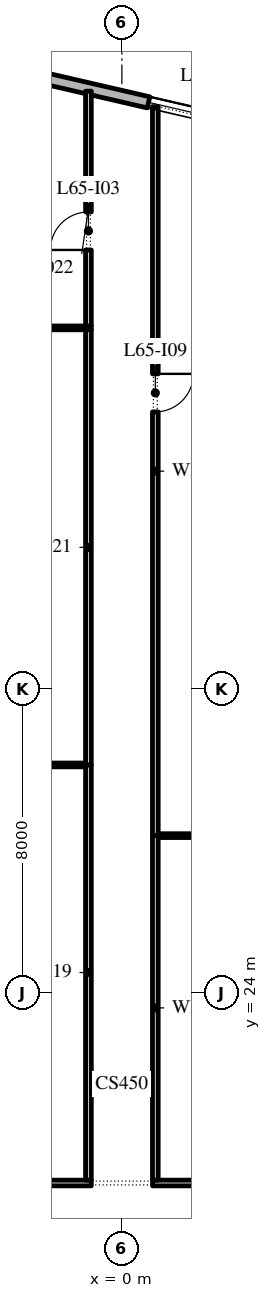
"""IFC4 building model, lengths in metres.
Left out: names, types, materials, properties, quantities, classifications, styles, units other than length and angle.
Written with IfcOpenShell. Run it as: python <this file> out.ifc"""

import sys

from ifc_helpers import new_model, si_unit, direction, frame, frame_2d, origin, place, context, subcontext, project, spatial, rectangle, extrude, element, fill, save


model = new_model("IFC4")
c1 = context("Model", 3, precision=1e-05, world=origin(), true_north=direction((0.0, 1.0)))
c2 = subcontext(c1, "Body", "Model", "MODEL_VIEW")
j1 = project(units=[si_unit("LENGTHUNIT", "METRE"), si_unit("PLANEANGLEUNIT", "RADIAN")], contexts=[c1])
p1 = place(None, origin())
s1 = spatial("IfcSite", under=j1, at=p1, CompositionType="ELEMENT")
p2 = place(p1, origin())
s2 = spatial("IfcBuilding", under=s1, at=p2, CompositionType="ELEMENT")
p3 = place(p2, frame((0.0, 0.0, 297.6)))
s3 = spatial("IfcBuildingStorey", under=s2, at=p3, CompositionType="ELEMENT", Elevation=297.6)
p4 = place(p3, frame((29.616, 40.758, 0.0), z_axis=(0.0, 0.0, 1.0), x_axis=(-0.974370532314, 0.224949029246, 0.0)))
e1 = element("IfcWall", 1, at=p4, inside=s3, PredefinedType="STANDARD", context=c2, shape_type="SweptSolid", body=[
    extrude(rectangle(XDim=48.0, YDim=0.3, at=frame_2d((24.0, 0.0))), origin(), (0.0, 0.0, 1.0), 4.95),
])
p5 = place(p4, frame((2.075, 0.0, 0.6)))
e2 = element("IfcOpeningElement", 2, at=p5, cuts=e1, PredefinedType="OPENING", context=c2, shape_type="SweptSolid", body=[
    extrude(rectangle(XDim=3.6, YDim=3.9, at=frame_2d((1.8, 1.95))), frame((0.0, 0.16, 0.0), z_axis=(0.0, -1.0, 0.0), x_axis=(1.0, 0.0, 0.0)), (0.0, 0.0, 1.0), 0.32),
])
p6 = place(p4, frame((9.975, 0.0, 0.6)))
e3 = element("IfcOpeningElement", 3, at=p6, cuts=e1, PredefinedType="OPENING", context=c2, shape_type="SweptSolid", body=[
    extrude(rectangle(XDim=3.6, YDim=3.55, at=frame_2d((1.8, 1.775))), frame((0.0, 0.16, 0.0), z_axis=(0.0, -1.0, 0.0), x_axis=(1.0, 0.0, 0.0)), (0.0, 0.0, 1.0), 0.32),
])
p7 = place(p4, frame((18.025, 0.0, 0.6)))
e4 = element("IfcOpeningElement", 4, at=p7, cuts=e1, PredefinedType="OPENING", context=c2, shape_type="SweptSolid", body=[
    extrude(rectangle(XDim=3.6, YDim=3.55, at=frame_2d((1.8, 1.775))), frame((0.0, 0.16, 0.0), z_axis=(0.0, -1.0, 0.0), x_axis=(1.0, 0.0, 0.0)), (0.0, 0.0, 1.0), 0.32),
])
p8 = place(p4, frame((26.075, 0.0, 0.6)))
e5 = element("IfcOpeningElement", 5, at=p8, cuts=e1, PredefinedType="OPENING", context=c2, shape_type="SweptSolid", body=[
    extrude(rectangle(XDim=3.6, YDim=3.9, at=frame_2d((1.8, 1.95))), frame((0.0, 0.16, 0.0), z_axis=(0.0, -1.0, 0.0), x_axis=(1.0, 0.0, 0.0)), (0.0, 0.0, 1.0), 0.32),
])
p9 = place(p4, frame((34.125, 0.0, 0.6)))
e6 = element("IfcOpeningElement", 6, at=p9, cuts=e1, PredefinedType="OPENING", context=c2, shape_type="SweptSolid", body=[
    extrude(rectangle(XDim=3.6, YDim=3.55, at=frame_2d((1.8, 1.775))), frame((0.0, 0.16, 0.0), z_axis=(0.0, -1.0, 0.0), x_axis=(1.0, 0.0, 0.0)), (0.0, 0.0, 1.0), 0.32),
])
p10 = place(p4, frame((42.175, 0.0, 0.6)))
e7 = element("IfcOpeningElement", 7, at=p10, cuts=e1, PredefinedType="OPENING", context=c2, shape_type="SweptSolid", body=[
    extrude(rectangle(XDim=3.6, YDim=3.9, at=frame_2d((1.8, 1.95))), frame((0.0, 0.16, 0.0), z_axis=(0.0, -1.0, 0.0), x_axis=(1.0, 0.0, 0.0)), (0.0, 0.0, 1.0), 0.32),
])
p11 = place(p3, frame((33.159, 47.524, -0.05), z_axis=(0.0, 0.0, 1.0), x_axis=(-0.974370681559, 0.224948382787, 0.0)))
e8 = element("IfcWall", 8, at=p11, inside=s3, PredefinedType="STANDARD", context=c2, shape_type="SweptSolid", body=[
    extrude(rectangle(XDim=51.76, YDim=0.2, at=frame_2d((25.88, 0.0))), origin(), (0.0, 0.0, 1.0), 1.1),
])
p12 = place(p3, frame((-8.475, 19.0, 0.0), z_axis=(0.0, 0.0, 1.0), x_axis=(1.0, 0.0, 0.0)))
e9 = element("IfcWall", 9, at=p12, inside=s3, PredefinedType="PARTITIONING", context=c2, shape_type="SweptSolid", body=[
    extrude(rectangle(XDim=7.67, YDim=0.15, at=frame_2d((3.835, 0.0))), origin(), (0.0, 0.0, 1.0), 4.95),
])
p13 = place(p3, frame((-8.325, 41.5, 0.0), z_axis=(0.0, 0.0, 1.0), x_axis=(1.0, 0.0, 0.0)))
e10 = element("IfcWall", 10, at=p13, inside=s3, PredefinedType="PARTITIONING", context=c2, shape_type="SweptSolid", body=[
    extrude(rectangle(XDim=7.52, YDim=0.1, at=frame_2d((3.76, 0.0))), origin(), (0.0, 0.0, 1.0), 4.95),
])
p14 = place(p3, frame((-0.88, 19.075, 0.0), z_axis=(0.0, 0.0, 1.0), x_axis=(0.0, 1.0, 0.0)))
e11 = element("IfcWall", 11, at=p14, inside=s3, PredefinedType="PARTITIONING", context=c2, shape_type="SweptSolid", body=[
    extrude(rectangle(XDim=10.925, YDim=0.15, at=frame_2d((5.462, 0.0))), origin(), (0.0, 0.0, 1.0), 4.95),
])
p15 = place(p3, frame((-0.955, 30.0, 0.0), z_axis=(0.0, 0.0, 1.0), x_axis=(-1.0, 0.0, 0.0)))
e12 = element("IfcWall", 12, at=p15, inside=s3, PredefinedType="PARTITIONING", context=c2, shape_type="SweptSolid", body=[
    extrude(rectangle(XDim=7.37, YDim=0.1, at=frame_2d((3.685, 0.0))), origin(), (0.0, 0.0, 1.0), 4.95),
])
p16 = place(p3, frame((-0.88, 30.0, 0.0), z_axis=(0.0, 0.0, 1.0), x_axis=(0.0, 1.0, 0.0)))
e13 = element("IfcWall", 13, at=p16, inside=s3, PredefinedType="PARTITIONING", context=c2, shape_type="SweptSolid", body=[
    extrude(rectangle(XDim=11.45, YDim=0.15, at=frame_2d((5.725, 0.0))), origin(), (0.0, 0.0, 1.0), 4.95),
])
p17 = place(p3, frame((-0.88, 41.55, 0.0), z_axis=(0.0, 0.0, 1.0), x_axis=(0.0, 1.0, 0.0)))
e14 = element("IfcWall", 14, at=p17, inside=s3, PredefinedType="PARTITIONING", context=c2, shape_type="SweptSolid", body=[
    extrude(rectangle(XDim=6.178, YDim=0.15, at=frame_2d((3.089, 0.0))), origin(), (0.0, 0.0, 1.0), 4.95),
])
p18 = place(p17, frame((2.0, 0.0, 0.0)))
e15 = element("IfcOpeningElement", 15, at=p18, cuts=e14, PredefinedType="OPENING", context=c2, shape_type="SweptSolid", body=[
    extrude(rectangle(XDim=1.0, YDim=2.1, at=frame_2d((0.5, 1.05))), frame((0.0, 0.085, 0.0), z_axis=(0.0, -1.0, 0.0), x_axis=(1.0, 0.0, 0.0)), (0.0, 0.0, 1.0), 0.17),
])
p19 = place(p3, frame((0.805, 19.0, 0.0), z_axis=(0.0, 0.0, 1.0), x_axis=(1.0, 0.0, 0.0)))
e16 = element("IfcWall", 16, at=p19, inside=s3, PredefinedType="PARTITIONING", context=c2, shape_type="SweptSolid", body=[
    extrude(rectangle(XDim=7.67, YDim=0.15, at=frame_2d((3.835, 0.0))), origin(), (0.0, 0.0, 1.0), 4.95),
])
p20 = place(p3, frame((0.88, 28.14, 0.0), z_axis=(0.0, 0.0, 1.0), x_axis=(0.0, -1.0, 0.0)))
e17 = element("IfcWall", 17, at=p20, inside=s3, PredefinedType="PARTITIONING", context=c2, shape_type="SweptSolid", body=[
    extrude(rectangle(XDim=9.065, YDim=0.15, at=frame_2d((4.532, 0.0))), origin(), (0.0, 0.0, 1.0), 4.95),
])
p21 = place(p3, frame((0.955, 28.14, 0.0), z_axis=(0.0, 0.0, 1.0), x_axis=(1.0, 0.0, 0.0)))
e18 = element("IfcWall", 18, at=p21, inside=s3, PredefinedType="PARTITIONING", context=c2, shape_type="SweptSolid", body=[
    extrude(rectangle(XDim=7.52, YDim=0.1, at=frame_2d((3.76, 0.0))), origin(), (0.0, 0.0, 1.0), 4.95),
])
p22 = place(p3, frame((0.88, 47.321, 0.0), z_axis=(0.0, 0.0, 1.0), x_axis=(0.0, -1.0, 0.0)))
e19 = element("IfcWall", 19, at=p22, inside=s3, PredefinedType="PARTITIONING", context=c2, shape_type="SweptSolid", body=[
    extrude(rectangle(XDim=19.181, YDim=0.15, at=frame_2d((9.591, 0.0))), origin(), (0.0, 0.0, 1.0), 4.95),
])
p23 = place(p22, frame((7.031, 0.0, 0.0)))
e20 = element("IfcOpeningElement", 20, at=p23, cuts=e19, PredefinedType="OPENING", context=c2, shape_type="SweptSolid", body=[
    extrude(rectangle(XDim=1.0, YDim=2.1, at=frame_2d((0.5, 1.05))), frame((0.0, 0.085, 0.0), z_axis=(0.0, -1.0, 0.0), x_axis=(1.0, 0.0, 0.0)), (0.0, 0.0, 1.0), 0.17),
])
p24 = place(p8, origin())
e21 = element("IfcWindow", 21, at=p24, inside=s3, PartitioningType="DOUBLE_PANEL_HORIZONTAL", PredefinedType="WINDOW", context=c2, shape_type="SweptSolid", body=[
    extrude(rectangle(XDim=3.6, YDim=3.9, at=frame_2d((1.8, 1.95))), frame((0.0, 0.03, 0.0), z_axis=(0.0, -1.0, 0.0), x_axis=(1.0, 0.0, 0.0)), (0.0, 0.0, 1.0), 0.06),
])
fill(e5, e21)
p25 = place(p18, origin())
e22 = element("IfcDoor", 22, at=p25, inside=s3, OperationType="SINGLE_SWING_RIGHT", PredefinedType="DOOR", context=c2, shape_type="SweptSolid", body=[
    extrude(rectangle(XDim=1.0, YDim=2.1, at=frame_2d((0.5, 1.05))), frame((0.0, 0.025, 0.0), z_axis=(0.0, -1.0, 0.0), x_axis=(1.0, 0.0, 0.0)), (0.0, 0.0, 1.0), 0.05),
])
fill(e15, e22)
p26 = place(p23, origin())
e23 = element("IfcDoor", 23, at=p26, inside=s3, OperationType="SINGLE_SWING_RIGHT", PredefinedType="DOOR", context=c2, shape_type="SweptSolid", body=[
    extrude(rectangle(XDim=1.0, YDim=2.1, at=frame_2d((0.5, 1.05))), frame((0.0, 0.025, 0.0), z_axis=(0.0, -1.0, 0.0), x_axis=(1.0, 0.0, 0.0)), (0.0, 0.0, 1.0), 0.05),
])
fill(e20, e23)
save(model, sys.argv[1])
